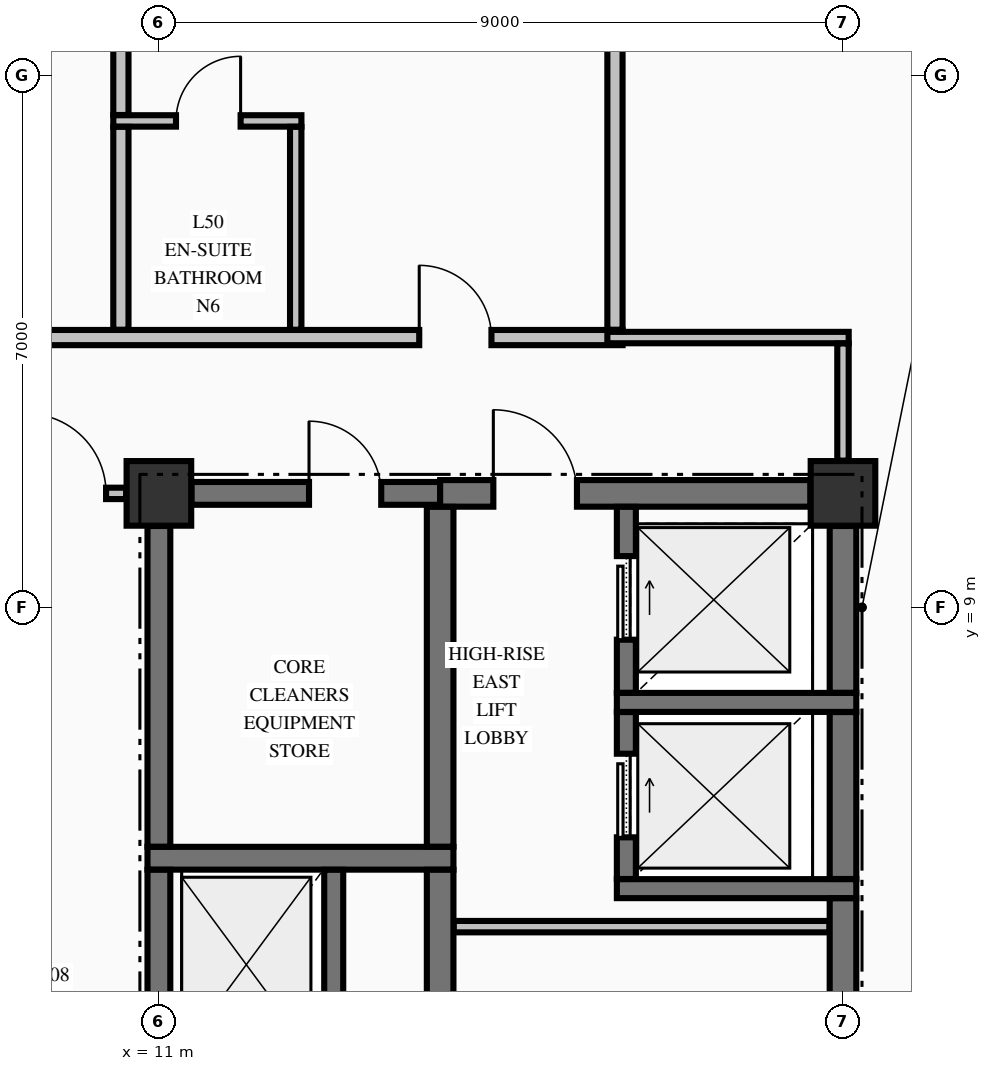
"""IFC4 building model, lengths in metres.
Left out: names, types, materials, properties, quantities, classifications, styles, units other than length and angle.
Written with IfcOpenShell. Run it as: python <this file> out.ifc"""

import sys

from ifc_helpers import new_model, si_unit, direction, frame, frame_2d, origin, origin_2d, place, context, subcontext, project, spatial, rectangle, extrude, element, fill, save


model = new_model("IFC4")
c1 = context("Model", 3, precision=1e-05, world=origin(), true_north=direction((0.0, 1.0)))
c2 = subcontext(c1, "Body", "Model", "MODEL_VIEW")
j1 = project(units=[si_unit("LENGTHUNIT", "METRE"), si_unit("PLANEANGLEUNIT", "RADIAN")], contexts=[c1])
p1 = place(None, origin())
s1 = spatial("IfcSite", under=j1, at=p1, CompositionType="ELEMENT")
p2 = place(p1, origin())
s2 = spatial("IfcBuilding", under=s1, at=p2, CompositionType="ELEMENT")
p3 = place(p2, frame((0.0, 0.0, 194.86)))
s3 = spatial("IfcBuildingStorey", under=s2, at=p3, CompositionType="ELEMENT", Elevation=194.86)
for number, where, z_axis, x_axis in (
    (1, (11.0, 10.5, -0.275), (0.0, 0.0, 1.0), (1.0, 0.0, 0.0)),
    (2, (20.0, 10.5, -0.275), (0.0, 0.0, 1.0), (1.0, 0.0, 0.0)),
):
    element("IfcColumn", number, at=place(p3, frame(where, z_axis=z_axis, x_axis=x_axis)), inside=s3, PredefinedType="COLUMN", context=c2, shape_type="SweptSolid", body=[
        extrude(rectangle(XDim=0.85, YDim=0.85, at=origin_2d()), origin(), (0.0, 0.0, 1.0), 3.425),
    ])
p4 = place(p3, frame((17.025, 5.3, 0.0), z_axis=(0.0, 0.0, 1.0), x_axis=(1.0, 0.0, 0.0)))
e3 = element("IfcWall", 3, at=p4, inside=s3, PredefinedType="SOLIDWALL", context=c2, shape_type="SweptSolid", body=[
    extrude(rectangle(XDim=3.15, YDim=0.25, at=frame_2d((1.575, 0.0))), origin(), (0.0, 0.0, 1.0), 3.15),
])
p5 = place(p3, frame((10.85, 5.7, 0.0), z_axis=(0.0, 0.0, 1.0), x_axis=(1.0, 0.0, 0.0)))
e4 = element("IfcWall", 4, at=p5, inside=s3, PredefinedType="SHEAR", context=c2, shape_type="SweptSolid", body=[
    extrude(rectangle(XDim=4.025, YDim=0.3, at=frame_2d((2.012, 0.0))), origin(), (0.0, 0.0, 1.0), 3.15),
])
p6 = place(p3, frame((17.025, 7.75, 0.0), z_axis=(0.0, 0.0, 1.0), x_axis=(1.0, 0.0, 0.0)))
e5 = element("IfcWall", 5, at=p6, inside=s3, PredefinedType="SOLIDWALL", context=c2, shape_type="SweptSolid", body=[
    extrude(rectangle(XDim=3.15, YDim=0.25, at=frame_2d((1.575, 0.0))), origin(), (0.0, 0.0, 1.0), 3.15),
])
p7 = place(p3, frame((11.429, 10.5, 0.0), z_axis=(0.0, 0.0, 1.0), x_axis=(1.0, 0.0, 0.0)))
e6 = element("IfcWall", 6, at=p7, inside=s3, PredefinedType="SHEAR", context=c2, shape_type="SweptSolid", body=[
    extrude(rectangle(XDim=3.271, YDim=0.3, at=frame_2d((1.635, 0.0))), origin(), (0.0, 0.0, 1.0), 3.15),
])
p8 = place(p7, frame((1.546, 0.0, 0.0)))
e7 = element("IfcOpeningElement", 7, at=p8, cuts=e6, PredefinedType="OPENING", context=c2, shape_type="SweptSolid", body=[
    extrude(rectangle(XDim=0.95, YDim=2.15, at=frame_2d((0.475, 1.075))), frame((0.0, 0.16, 0.0), z_axis=(0.0, -1.0, 0.0), x_axis=(1.0, 0.0, 0.0)), (0.0, 0.0, 1.0), 0.32),
])
p9 = place(p3, frame((14.7, 10.5, 0.0), z_axis=(0.0, 0.0, 1.0), x_axis=(1.0, 0.0, 0.0)))
e8 = element("IfcWall", 8, at=p9, inside=s3, PredefinedType="SHEAR", context=c2, shape_type="SweptSolid", body=[
    extrude(rectangle(XDim=4.871, YDim=0.35, at=frame_2d((2.436, 0.0))), origin(), (0.0, 0.0, 1.0), 3.15),
])
p10 = place(p9, frame((0.7, 0.0, 0.0)))
e9 = element("IfcOpeningElement", 9, at=p10, cuts=e8, PredefinedType="OPENING", context=c2, shape_type="SweptSolid", body=[
    extrude(rectangle(XDim=1.1, YDim=2.15, at=frame_2d((0.55, 1.075))), frame((0.0, 0.185, 0.0), z_axis=(0.0, -1.0, 0.0), x_axis=(1.0, 0.0, 0.0)), (0.0, 0.0, 1.0), 0.37),
])
p11 = place(p3, frame((14.878, 4.8, 0.0), z_axis=(0.0, 0.0, 1.0), x_axis=(1.0, 0.0, 0.0)))
e10 = element("IfcWall", 10, at=p11, inside=s3, PredefinedType="PARTITIONING", context=c2, shape_type="SweptSolid", body=[
    extrude(rectangle(XDim=4.944, YDim=0.15, at=frame_2d((2.472, 0.0))), origin(), (0.0, 0.0, 1.0), 3.15),
])
p12 = place(p3, frame((-10.569, 10.5, 0.0), z_axis=(0.0, 0.0, 1.0), x_axis=(1.0, 0.0, 0.0)))
e11 = element("IfcWall", 11, at=p12, inside=s3, PredefinedType="PARTITIONING", context=c2, shape_type="SweptSolid", body=[
    extrude(rectangle(XDim=21.138, YDim=0.15, at=frame_2d((10.569, 0.0))), origin(), (0.0, 0.0, 1.0), 3.15),
])
p13 = place(p12, frame((0.264, 0.0, 0.0)))
e12 = element("IfcOpeningElement", 12, at=p13, cuts=e11, PredefinedType="OPENING", context=c2, shape_type="SweptSolid", body=[
    extrude(rectangle(XDim=1.05, YDim=2.15, at=frame_2d((0.525, 1.075))), frame((0.0, 0.085, 0.0), z_axis=(0.0, -1.0, 0.0), x_axis=(1.0, 0.0, 0.0)), (0.0, 0.0, 1.0), 0.17),
])
p14 = place(p12, frame((19.824, 0.0, 0.0)))
e13 = element("IfcOpeningElement", 13, at=p14, cuts=e11, PredefinedType="OPENING", context=c2, shape_type="SweptSolid", body=[
    extrude(rectangle(XDim=1.05, YDim=2.15, at=frame_2d((0.525, 1.075))), frame((0.0, 0.085, 0.0), z_axis=(0.0, -1.0, 0.0), x_axis=(1.0, 0.0, 0.0)), (0.0, 0.0, 1.0), 0.17),
])
p15 = place(p3, frame((-22.1, 12.55, 0.0), z_axis=(0.0, 0.0, 1.0), x_axis=(1.0, 0.0, 0.0)))
e14 = element("IfcWall", 14, at=p15, inside=s3, PredefinedType="PARTITIONING", context=c2, shape_type="SweptSolid", body=[
    extrude(rectangle(XDim=39.2, YDim=0.2, at=frame_2d((19.6, 0.0))), origin(), (0.0, 0.0, 1.0), 3.15),
])
p16 = place(p15, frame((4.925, 0.0, 0.0)))
e15 = element("IfcOpeningElement", 15, at=p16, cuts=e14, PredefinedType="OPENING", context=c2, shape_type="SweptSolid", body=[
    extrude(rectangle(XDim=0.95, YDim=2.15, at=frame_2d((0.475, 1.075))), frame((0.0, 0.11, 0.0), z_axis=(0.0, -1.0, 0.0), x_axis=(1.0, 0.0, 0.0)), (0.0, 0.0, 1.0), 0.22),
])
p17 = place(p15, frame((12.375, 0.0, 0.0)))
e16 = element("IfcOpeningElement", 16, at=p17, cuts=e14, PredefinedType="OPENING", context=c2, shape_type="SweptSolid", body=[
    extrude(rectangle(XDim=0.95, YDim=2.15, at=frame_2d((0.475, 1.075))), frame((0.0, 0.11, 0.0), z_axis=(0.0, -1.0, 0.0), x_axis=(1.0, 0.0, 0.0)), (0.0, 0.0, 1.0), 0.22),
])
p18 = place(p15, frame((18.575, 0.0, 0.0)))
e17 = element("IfcOpeningElement", 17, at=p18, cuts=e14, PredefinedType="OPENING", context=c2, shape_type="SweptSolid", body=[
    extrude(rectangle(XDim=0.95, YDim=2.15, at=frame_2d((0.475, 1.075))), frame((0.0, 0.11, 0.0), z_axis=(0.0, -1.0, 0.0), x_axis=(1.0, 0.0, 0.0)), (0.0, 0.0, 1.0), 0.22),
])
p19 = place(p15, frame((24.475, 0.0, 0.0)))
e18 = element("IfcOpeningElement", 18, at=p19, cuts=e14, PredefinedType="OPENING", context=c2, shape_type="SweptSolid", body=[
    extrude(rectangle(XDim=0.95, YDim=2.15, at=frame_2d((0.475, 1.075))), frame((0.0, 0.11, 0.0), z_axis=(0.0, -1.0, 0.0), x_axis=(1.0, 0.0, 0.0)), (0.0, 0.0, 1.0), 0.22),
])
p20 = place(p15, frame((30.375, 0.0, 0.0)))
e19 = element("IfcOpeningElement", 19, at=p20, cuts=e14, PredefinedType="OPENING", context=c2, shape_type="SweptSolid", body=[
    extrude(rectangle(XDim=0.95, YDim=2.15, at=frame_2d((0.475, 1.075))), frame((0.0, 0.11, 0.0), z_axis=(0.0, -1.0, 0.0), x_axis=(1.0, 0.0, 0.0)), (0.0, 0.0, 1.0), 0.22),
])
p21 = place(p15, frame((36.525, 0.0, 0.0)))
e20 = element("IfcOpeningElement", 20, at=p21, cuts=e14, PredefinedType="OPENING", context=c2, shape_type="SweptSolid", body=[
    extrude(rectangle(XDim=0.95, YDim=2.15, at=frame_2d((0.475, 1.075))), frame((0.0, 0.11, 0.0), z_axis=(0.0, -1.0, 0.0), x_axis=(1.0, 0.0, 0.0)), (0.0, 0.0, 1.0), 0.22),
])
p22 = place(p3, frame((16.9, 12.55, 0.0), z_axis=(0.0, 0.0, 1.0), x_axis=(1.0, 0.0, 0.0)))
e21 = element("IfcWall", 21, at=p22, inside=s3, PredefinedType="PARTITIONING", context=c2, shape_type="SweptSolid", body=[
    extrude(rectangle(XDim=3.175, YDim=0.15, at=frame_2d((1.587, 0.0))), origin(), (0.0, 0.0, 1.0), 3.15),
])
p23 = place(p3, frame((10.4, 15.4, 0.0), z_axis=(0.0, 0.0, 1.0), x_axis=(1.0, 0.0, 0.0)))
e22 = element("IfcWall", 22, at=p23, inside=s3, PredefinedType="PARTITIONING", context=c2, shape_type="SweptSolid", body=[
    extrude(rectangle(XDim=2.475, YDim=0.15, at=frame_2d((1.238, 0.0))), origin(), (0.0, 0.0, 1.0), 3.15),
])
p24 = place(p23, frame((0.825, 0.0, 0.0)))
e23 = element("IfcOpeningElement", 23, at=p24, cuts=e22, PredefinedType="OPENING", context=c2, shape_type="SweptSolid", body=[
    extrude(rectangle(XDim=0.85, YDim=2.1, at=frame_2d((0.425, 1.05))), frame((0.0, 0.085, 0.0), z_axis=(0.0, -1.0, 0.0), x_axis=(1.0, 0.0, 0.0)), (0.0, 0.0, 1.0), 0.17),
])
p25 = place(p3, frame((11.0, 3.052, 0.0), z_axis=(0.0, 0.0, 1.0), x_axis=(0.0, 1.0, 0.0)))
e24 = element("IfcWall", 24, at=p25, inside=s3, PredefinedType="SHEAR", context=c2, shape_type="SweptSolid", body=[
    extrude(rectangle(XDim=2.496, YDim=0.3, at=frame_2d((1.248, 0.0))), origin(), (0.0, 0.0, 1.0), 3.15),
])
p26 = place(p3, frame((11.0, 5.852, 0.0), z_axis=(0.0, 0.0, 1.0), x_axis=(0.0, 1.0, 0.0)))
e25 = element("IfcWall", 25, at=p26, inside=s3, PredefinedType="SHEAR", context=c2, shape_type="SweptSolid", body=[
    extrude(rectangle(XDim=4.219, YDim=0.3, at=frame_2d((2.109, 0.0))), origin(), (0.0, 0.0, 1.0), 3.15),
])
p27 = place(p3, frame((13.3, 3.052, 0.0), z_axis=(0.0, 0.0, 1.0), x_axis=(0.0, 1.0, 0.0)))
e26 = element("IfcWall", 26, at=p27, inside=s3, PredefinedType="SOLIDWALL", context=c2, shape_type="SweptSolid", body=[
    extrude(rectangle(XDim=2.496, YDim=0.25, at=frame_2d((1.248, 0.0))), origin(), (0.0, 0.0, 1.0), 3.15),
])
p28 = place(p3, frame((14.7, 3.052, 0.0), z_axis=(0.0, 0.0, 1.0), x_axis=(0.0, 1.0, 0.0)))
e27 = element("IfcWall", 27, at=p28, inside=s3, PredefinedType="SHEAR", context=c2, shape_type="SweptSolid", body=[
    extrude(rectangle(XDim=2.496, YDim=0.35, at=frame_2d((1.248, 0.0))), origin(), (0.0, 0.0, 1.0), 3.15),
])
p29 = place(p3, frame((14.7, 5.852, 0.0), z_axis=(0.0, 0.0, 1.0), x_axis=(0.0, 1.0, 0.0)))
e28 = element("IfcWall", 28, at=p29, inside=s3, PredefinedType="SHEAR", context=c2, shape_type="SweptSolid", body=[
    extrude(rectangle(XDim=4.471, YDim=0.35, at=frame_2d((2.235, 0.0))), origin(), (0.0, 0.0, 1.0), 3.15),
])
p30 = place(p3, frame((17.15, 5.427, 0.0), z_axis=(0.0, 0.0, 1.0), x_axis=(0.0, 1.0, 0.0)))
e29 = element("IfcWall", 29, at=p30, inside=s3, PredefinedType="SOLIDWALL", context=c2, shape_type="SweptSolid", body=[
    extrude(rectangle(XDim=2.196, YDim=0.25, at=frame_2d((1.098, 0.0))), origin(), (0.0, 0.0, 1.0), 3.15),
])
p31 = place(p30, frame((0.548, 0.0, 0.0)))
e30 = element("IfcOpeningElement", 30, at=p31, cuts=e29, PredefinedType="OPENING", context=c2, shape_type="SweptSolid", body=[
    extrude(rectangle(XDim=1.1, YDim=2.2, at=frame_2d((0.55, 1.1))), frame((0.0, 0.135, 0.0), z_axis=(0.0, -1.0, 0.0), x_axis=(1.0, 0.0, 0.0)), (0.0, 0.0, 1.0), 0.27),
])
p32 = place(p3, frame((17.15, 7.877, 0.0), z_axis=(0.0, 0.0, 1.0), x_axis=(0.0, 1.0, 0.0)))
e31 = element("IfcWall", 31, at=p32, inside=s3, PredefinedType="SOLIDWALL", context=c2, shape_type="SweptSolid", body=[
    extrude(rectangle(XDim=2.446, YDim=0.25, at=frame_2d((1.223, 0.0))), origin(), (0.0, 0.0, 1.0), 3.15),
])
p33 = place(p32, frame((0.698, 0.0, 0.0)))
e32 = element("IfcOpeningElement", 32, at=p33, cuts=e31, PredefinedType="OPENING", context=c2, shape_type="SweptSolid", body=[
    extrude(rectangle(XDim=1.1, YDim=2.2, at=frame_2d((0.55, 1.1))), frame((0.0, 0.135, 0.0), z_axis=(0.0, -1.0, 0.0), x_axis=(1.0, 0.0, 0.0)), (0.0, 0.0, 1.0), 0.27),
])
p34 = place(p3, frame((20.0, 0.429, 0.0), z_axis=(0.0, 0.0, 1.0), x_axis=(0.0, 1.0, 0.0)))
e33 = element("IfcWall", 33, at=p34, inside=s3, PredefinedType="SHEAR", context=c2, shape_type="SweptSolid", body=[
    extrude(rectangle(XDim=4.744, YDim=0.35, at=frame_2d((2.372, 0.0))), origin(), (0.0, 0.0, 1.0), 3.15),
])
p35 = place(p3, frame((20.0, 5.427, 0.0), z_axis=(0.0, 0.0, 1.0), x_axis=(0.0, 1.0, 0.0)))
e34 = element("IfcWall", 34, at=p35, inside=s3, PredefinedType="SHEAR", context=c2, shape_type="SweptSolid", body=[
    extrude(rectangle(XDim=2.196, YDim=0.35, at=frame_2d((1.098, 0.0))), origin(), (0.0, 0.0, 1.0), 3.15),
])
p36 = place(p3, frame((20.0, 7.877, 0.0), z_axis=(0.0, 0.0, 1.0), x_axis=(0.0, 1.0, 0.0)))
e35 = element("IfcWall", 35, at=p36, inside=s3, PredefinedType="SHEAR", context=c2, shape_type="SweptSolid", body=[
    extrude(rectangle(XDim=2.194, YDim=0.35, at=frame_2d((1.097, 0.0))), origin(), (0.0, 0.0, 1.0), 3.15),
])
p37 = place(p3, frame((10.5, 12.653, 0.0), z_axis=(0.0, 0.0, 1.0), x_axis=(0.0, 1.0, 0.0)))
e36 = element("IfcWall", 36, at=p37, inside=s3, PredefinedType="PARTITIONING", context=c2, shape_type="SweptSolid", body=[
    extrude(rectangle(XDim=2.669, YDim=0.2, at=frame_2d((1.334, 0.0))), origin(), (0.0, 0.0, 1.0), 3.15),
])
p38 = place(p3, frame((10.5, 15.478, 0.0), z_axis=(0.0, 0.0, 1.0), x_axis=(0.0, 1.0, 0.0)))
e37 = element("IfcWall", 37, at=p38, inside=s3, PredefinedType="PARTITIONING", context=c2, shape_type="SweptSolid", body=[
    extrude(rectangle(XDim=8.516, YDim=0.2, at=frame_2d((4.258, 0.0))), origin(), (0.0, 0.0, 1.0), 3.15),
])
p39 = place(p3, frame((12.8, 12.653, 0.0), z_axis=(0.0, 0.0, 1.0), x_axis=(0.0, 1.0, 0.0)))
e38 = element("IfcWall", 38, at=p39, inside=s3, PredefinedType="PARTITIONING", context=c2, shape_type="SweptSolid", body=[
    extrude(rectangle(XDim=2.669, YDim=0.15, at=frame_2d((1.334, 0.0))), origin(), (0.0, 0.0, 1.0), 3.15),
])
p40 = place(p3, frame((17.0, 12.653, 0.0), z_axis=(0.0, 0.0, 1.0), x_axis=(0.0, 1.0, 0.0)))
e39 = element("IfcWall", 39, at=p40, inside=s3, PredefinedType="PARTITIONING", context=c2, shape_type="SweptSolid", body=[
    extrude(rectangle(XDim=6.341, YDim=0.2, at=frame_2d((3.17, 0.0))), origin(), (0.0, 0.0, 1.0), 3.15),
])
p41 = place(p3, frame((20.0, 10.931, 0.0), z_axis=(0.0, 0.0, 1.0), x_axis=(0.0, 1.0, 0.0)))
e40 = element("IfcWall", 40, at=p41, inside=s3, PredefinedType="PARTITIONING", context=c2, shape_type="SweptSolid", body=[
    extrude(rectangle(XDim=1.541, YDim=0.15, at=frame_2d((0.771, 0.0))), origin(), (0.0, 0.0, 1.0), 2.342),
])
p42 = place(p8, origin())
e41 = element("IfcDoor", 41, at=p42, inside=s3, OperationType="SINGLE_SWING_LEFT", PredefinedType="DOOR", context=c2, shape_type="SweptSolid", body=[
    extrude(rectangle(XDim=0.95, YDim=2.15, at=frame_2d((0.475, 1.075))), frame((0.0, 0.025, 0.0), z_axis=(0.0, -1.0, 0.0), x_axis=(1.0, 0.0, 0.0)), (0.0, 0.0, 1.0), 0.05),
])
fill(e7, e41)
p43 = place(p31, origin())
e42 = element("IfcDoor", 42, at=p43, inside=s3, OperationType="SLIDING_TO_RIGHT", PredefinedType="DOOR", context=c2, shape_type="SweptSolid", body=[
    extrude(rectangle(XDim=1.1, YDim=2.2, at=frame_2d((0.55, 1.1))), frame((0.0, 0.025, 0.0), z_axis=(0.0, -1.0, 0.0), x_axis=(1.0, 0.0, 0.0)), (0.0, 0.0, 1.0), 0.05),
])
fill(e30, e42)
p44 = place(p33, origin())
e43 = element("IfcDoor", 43, at=p44, inside=s3, OperationType="SLIDING_TO_RIGHT", PredefinedType="DOOR", context=c2, shape_type="SweptSolid", body=[
    extrude(rectangle(XDim=1.1, YDim=2.2, at=frame_2d((0.55, 1.1))), frame((0.0, 0.025, 0.0), z_axis=(0.0, -1.0, 0.0), x_axis=(1.0, 0.0, 0.0)), (0.0, 0.0, 1.0), 0.05),
])
fill(e32, e43)
p45 = place(p10, origin())
e44 = element("IfcDoor", 44, at=p45, inside=s3, OperationType="SINGLE_SWING_LEFT", PredefinedType="DOOR", context=c2, shape_type="SweptSolid", body=[
    extrude(rectangle(XDim=1.1, YDim=2.15, at=frame_2d((0.55, 1.075))), frame((0.0, 0.025, 0.0), z_axis=(0.0, -1.0, 0.0), x_axis=(1.0, 0.0, 0.0)), (0.0, 0.0, 1.0), 0.05),
])
fill(e9, e44)
p46 = place(p14, origin())
e45 = element("IfcDoor", 45, at=p46, inside=s3, OperationType="SINGLE_SWING_LEFT", PredefinedType="DOOR", context=c2, shape_type="SweptSolid", body=[
    extrude(rectangle(XDim=1.05, YDim=2.15, at=frame_2d((0.525, 1.075))), frame((0.0, 0.025, 0.0), z_axis=(0.0, -1.0, 0.0), x_axis=(1.0, 0.0, 0.0)), (0.0, 0.0, 1.0), 0.05),
])
fill(e13, e45)
p47 = place(p21, origin())
e46 = element("IfcDoor", 46, at=p47, inside=s3, OperationType="SINGLE_SWING_LEFT", PredefinedType="DOOR", context=c2, shape_type="SweptSolid", body=[
    extrude(rectangle(XDim=0.95, YDim=2.15, at=frame_2d((0.475, 1.075))), frame((0.0, 0.025, 0.0), z_axis=(0.0, -1.0, 0.0), x_axis=(1.0, 0.0, 0.0)), (0.0, 0.0, 1.0), 0.05),
])
fill(e20, e46)
p48 = place(p24, origin())
e47 = element("IfcDoor", 47, at=p48, inside=s3, OperationType="SINGLE_SWING_RIGHT", PredefinedType="DOOR", context=c2, shape_type="SweptSolid", body=[
    extrude(rectangle(XDim=0.85, YDim=2.1, at=frame_2d((0.425, 1.05))), frame((0.0, 0.025, 0.0), z_axis=(0.0, -1.0, 0.0), x_axis=(1.0, 0.0, 0.0)), (0.0, 0.0, 1.0), 0.05),
])
fill(e23, e47)
save(model, sys.argv[1])
